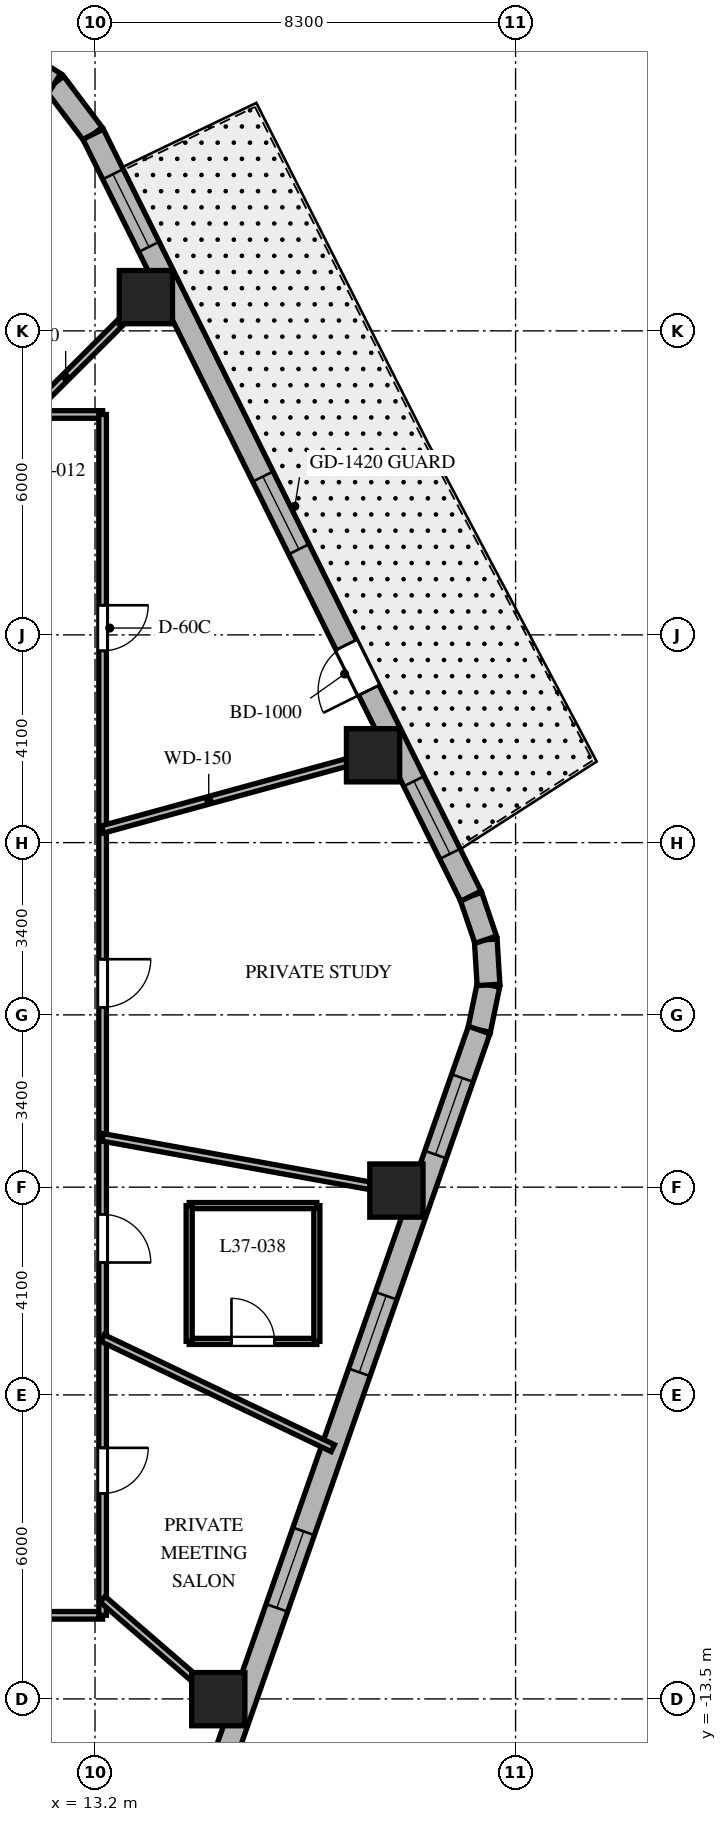
"""IFC4 building model, lengths in metres.
Left out: names, types, materials, properties, quantities, classifications, styles, units other than length and angle.
Written with IfcOpenShell. Run it as: python <this file> out.ifc"""

import sys

from ifc_helpers import new_model, si_unit, direction, frame, frame_2d, origin, origin_2d, place, context, subcontext, project, spatial, rectangle, extrude, element, fill, save


model = new_model("IFC4")
c1 = context("Model", 3, precision=1e-05, world=origin(), true_north=direction((0.0, 1.0)))
c2 = subcontext(c1, "Body", "Model", "MODEL_VIEW")
j1 = project(units=[si_unit("LENGTHUNIT", "METRE"), si_unit("PLANEANGLEUNIT", "RADIAN")], contexts=[c1])
p1 = place(None, origin())
s1 = spatial("IfcSite", under=j1, at=p1, CompositionType="ELEMENT")
p2 = place(p1, origin())
s2 = spatial("IfcBuilding", under=s1, at=p2, CompositionType="ELEMENT")
p3 = place(p2, frame((0.0, 0.0, 151.7)))
s3 = spatial("IfcBuildingStorey", under=s2, at=p3, CompositionType="ELEMENT", Elevation=151.7)
for number, where, z_axis, x_axis in (
    (1, (15.633, -13.505, 0.0), (0.0, 0.0, 1.0), (1.0, 0.0, 0.0)),
    (2, (19.148, -3.467, 0.0), (0.0, 0.0, 1.0), (1.0, 0.0, 0.0)),
    (3, (18.687, 5.124, 0.0), (0.0, 0.0, 1.0), (1.0, 0.0, 0.0)),
    (4, (14.204, 14.166, 0.0), (0.0, 0.0, 1.0), (1.0, 0.0, 0.0)),
):
    element("IfcColumn", number, at=place(p3, frame(where, z_axis=z_axis, x_axis=x_axis)), inside=s3, PredefinedType="COLUMN", context=c2, shape_type="SweptSolid", body=[
        extrude(rectangle(XDim=1.05, YDim=1.05, at=origin_2d()), origin(), (0.0, 0.0, 1.0), 3.7),
    ])
p4 = place(p3, frame((20.782, -0.298, 0.0), z_axis=(0.0, 0.0, 1.0), x_axis=(0.202570068411, 0.979267771033, 0.0)))
e5 = element("IfcWall", 5, at=p4, inside=s3, PredefinedType="SOLIDWALL", context=c2, shape_type="SweptSolid", body=[
    extrude(rectangle(XDim=0.909, YDim=0.45, at=frame_2d((0.454, 0.0))), origin(), (0.0, 0.0, 1.0), 3.4),
])
p5 = place(p3, frame((20.966, 0.592, 0.0), z_axis=(0.0, 0.0, 1.0), x_axis=(-0.061748898935, 0.998091715966, 0.0)))
e6 = element("IfcWall", 6, at=p5, inside=s3, PredefinedType="SOLIDWALL", context=c2, shape_type="SweptSolid", body=[
    extrude(rectangle(XDim=0.894, YDim=0.45, at=frame_2d((0.447, 0.0))), origin(), (0.0, 0.0, 1.0), 3.4),
])
p6 = place(p3, frame((20.911, 1.484, 0.0), z_axis=(0.0, 0.0, 1.0), x_axis=(-0.321623334353, 0.946867694453, 0.0)))
e7 = element("IfcWall", 7, at=p6, inside=s3, PredefinedType="SOLIDWALL", context=c2, shape_type="SweptSolid", body=[
    extrude(rectangle(XDim=0.909, YDim=0.45, at=frame_2d((0.454, 0.0))), origin(), (0.0, 0.0, 1.0), 3.4),
])
p7 = place(p3, frame((13.162, 17.381, 0.0), z_axis=(0.0, 0.0, 1.0), x_axis=(-0.601515770517, 0.798860925205, 0.0)))
e8 = element("IfcWall", 8, at=p7, inside=s3, PredefinedType="SOLIDWALL", context=c2, shape_type="SweptSolid", body=[
    extrude(rectangle(XDim=1.262, YDim=0.45, at=frame_2d((0.631, 0.0))), origin(), (0.0, 0.0, 1.0), 3.4),
])
p8 = place(p3, frame((12.403, 18.389, 0.0), z_axis=(0.0, 0.0, 1.0), x_axis=(-0.849795170926, 0.527113049991, 0.0)))
e9 = element("IfcWall", 9, at=p8, inside=s3, PredefinedType="SOLIDWALL", context=c2, shape_type="SweptSolid", body=[
    extrude(rectangle(XDim=1.241, YDim=0.45, at=frame_2d((0.62, 0.0))), origin(), (0.0, 0.0, 1.0), 3.4),
])
p9 = place(p3, frame((14.937, -16.993, 0.0), z_axis=(0.0, 0.0, 1.0), x_axis=(0.330431575061, 0.943829949834, 0.0)))
e10 = element("IfcWall", 10, at=p9, inside=s3, PredefinedType="SOLIDWALL", context=c2, shape_type="SweptSolid", body=[
    extrude(rectangle(XDim=17.689, YDim=0.45, at=frame_2d((8.844, 0.0))), origin(), (0.0, 0.0, 1.0), 3.4),
])
p10 = place(p9, frame((0.95, 0.0, 0.8)))
e11 = element("IfcOpeningElement", 11, at=p10, cuts=e10, PredefinedType="OPENING", context=c2, shape_type="SweptSolid", body=[
    extrude(rectangle(XDim=1.6, YDim=1.75, at=frame_2d((0.8, 0.875))), frame((0.0, 0.235, 0.0), z_axis=(0.0, -1.0, 0.0), x_axis=(1.0, 0.0, 0.0)), (0.0, 0.0, 1.0), 0.47),
])
p11 = place(p9, frame((5.605, 0.0, 0.8)))
e12 = element("IfcOpeningElement", 12, at=p11, cuts=e10, PredefinedType="OPENING", context=c2, shape_type="SweptSolid", body=[
    extrude(rectangle(XDim=1.6, YDim=1.75, at=frame_2d((0.8, 0.875))), frame((0.0, 0.235, 0.0), z_axis=(0.0, -1.0, 0.0), x_axis=(1.0, 0.0, 0.0)), (0.0, 0.0, 1.0), 0.47),
])
p12 = place(p9, frame((10.531, 0.0, 0.8)))
e13 = element("IfcOpeningElement", 13, at=p12, cuts=e10, PredefinedType="OPENING", context=c2, shape_type="SweptSolid", body=[
    extrude(rectangle(XDim=1.6, YDim=1.75, at=frame_2d((0.8, 0.875))), frame((0.0, 0.235, 0.0), z_axis=(0.0, -1.0, 0.0), x_axis=(1.0, 0.0, 0.0)), (0.0, 0.0, 1.0), 0.47),
])
p13 = place(p9, frame((15.084, 0.0, 0.8)))
e14 = element("IfcOpeningElement", 14, at=p13, cuts=e10, PredefinedType="OPENING", context=c2, shape_type="SweptSolid", body=[
    extrude(rectangle(XDim=1.6, YDim=1.75, at=frame_2d((0.8, 0.875))), frame((0.0, 0.235, 0.0), z_axis=(0.0, -1.0, 0.0), x_axis=(1.0, 0.0, 0.0)), (0.0, 0.0, 1.0), 0.47),
])
p14 = place(p3, frame((20.618, 2.344, 0.0), z_axis=(0.0, 0.0, 1.0), x_axis=(-0.444243691097, 0.895905990002, 0.0)))
e15 = element("IfcWall", 15, at=p14, inside=s3, PredefinedType="SOLIDWALL", context=c2, shape_type="SweptSolid", body=[
    extrude(rectangle(XDim=16.784, YDim=0.45, at=frame_2d((8.392, 0.0))), origin(), (0.0, 0.0, 1.0), 3.4),
])
p15 = place(p14, frame((4.535, 0.0, 0.0)))
e16 = element("IfcOpeningElement", 16, at=p15, cuts=e15, PredefinedType="OPENING", context=c2, shape_type="SweptSolid", body=[
    extrude(rectangle(XDim=1.0, YDim=2.15, at=frame_2d((0.5, 1.075))), frame((0.0, 0.235, 0.0), z_axis=(0.0, -1.0, 0.0), x_axis=(1.0, 0.0, 0.0)), (0.0, 0.0, 1.0), 0.47),
])
p16 = place(p14, frame((7.642, 0.0, 0.8)))
e17 = element("IfcOpeningElement", 17, at=p16, cuts=e15, PredefinedType="OPENING", context=c2, shape_type="SweptSolid", body=[
    extrude(rectangle(XDim=1.6, YDim=1.75, at=frame_2d((0.8, 0.875))), frame((0.0, 0.235, 0.0), z_axis=(0.0, -1.0, 0.0), x_axis=(1.0, 0.0, 0.0)), (0.0, 0.0, 1.0), 0.47),
])
p17 = place(p14, frame((14.303, 0.0, 0.8)))
e18 = element("IfcOpeningElement", 18, at=p17, cuts=e15, PredefinedType="OPENING", context=c2, shape_type="SweptSolid", body=[
    extrude(rectangle(XDim=1.6, YDim=1.75, at=frame_2d((0.8, 0.875))), frame((0.0, 0.235, 0.0), z_axis=(0.0, -1.0, 0.0), x_axis=(1.0, 0.0, 0.0)), (0.0, 0.0, 1.0), 0.47),
])
p18 = place(p14, frame((0.931, 0.0, 0.8)))
e19 = element("IfcOpeningElement", 19, at=p18, cuts=e15, PredefinedType="OPENING", context=c2, shape_type="SweptSolid", body=[
    extrude(rectangle(XDim=1.6, YDim=1.75, at=frame_2d((0.8, 0.875))), frame((0.0, 0.235, 0.0), z_axis=(0.0, -1.0, 0.0), x_axis=(1.0, 0.0, 0.0)), (0.0, 0.0, 1.0), 0.47),
])
p19 = place(p3, frame((13.35, -11.85, 0.0), z_axis=(0.0, 0.0, 1.0), x_axis=(-1.0, 0.0, 0.0)))
e20 = element("IfcWall", 20, at=p19, inside=s3, PredefinedType="PARTITIONING", context=c2, shape_type="SweptSolid", body=[
    extrude(rectangle(XDim=26.7, YDim=0.15, at=frame_2d((13.35, 0.0))), origin(), (0.0, 0.0, 1.0), 2.84),
])
p20 = place(p19, frame((20.682, 0.0, 0.0)))
e21 = element("IfcOpeningElement", 21, at=p20, cuts=e20, PredefinedType="OPENING", context=c2, shape_type="SweptSolid", body=[
    extrude(rectangle(XDim=0.95, YDim=2.03, at=frame_2d((0.475, 1.015))), frame((0.0, 0.085, 0.0), z_axis=(0.0, -1.0, 0.0), x_axis=(1.0, 0.0, 0.0)), (0.0, 0.0, 1.0), 0.17),
])
p21 = place(p19, frame((12.362, 0.0, 0.0)))
e22 = element("IfcOpeningElement", 22, at=p21, cuts=e20, PredefinedType="OPENING", context=c2, shape_type="SweptSolid", body=[
    extrude(rectangle(XDim=0.95, YDim=2.03, at=frame_2d((0.475, 1.015))), frame((0.0, 0.085, 0.0), z_axis=(0.0, -1.0, 0.0), x_axis=(1.0, 0.0, 0.0)), (0.0, 0.0, 1.0), 0.17),
])
p22 = place(p19, frame((3.995, 0.0, 0.0)))
e23 = element("IfcOpeningElement", 23, at=p22, cuts=e20, PredefinedType="OPENING", context=c2, shape_type="SweptSolid", body=[
    extrude(rectangle(XDim=0.95, YDim=2.03, at=frame_2d((0.475, 1.015))), frame((0.0, 0.085, 0.0), z_axis=(0.0, -1.0, 0.0), x_axis=(1.0, 0.0, 0.0)), (0.0, 0.0, 1.0), 0.17),
])
p23 = place(p3, frame((-13.35, 11.85, 0.0), z_axis=(0.0, 0.0, 1.0), x_axis=(1.0, 0.0, 0.0)))
e24 = element("IfcWall", 24, at=p23, inside=s3, PredefinedType="PARTITIONING", context=c2, shape_type="SweptSolid", body=[
    extrude(rectangle(XDim=26.7, YDim=0.15, at=frame_2d((13.35, 0.0))), origin(), (0.0, 0.0, 1.0), 2.84),
])
p24 = place(p23, frame((20.682, 0.0, 0.0)))
e25 = element("IfcOpeningElement", 25, at=p24, cuts=e24, PredefinedType="OPENING", context=c2, shape_type="SweptSolid", body=[
    extrude(rectangle(XDim=0.95, YDim=2.03, at=frame_2d((0.475, 1.015))), frame((0.0, 0.085, 0.0), z_axis=(0.0, -1.0, 0.0), x_axis=(1.0, 0.0, 0.0)), (0.0, 0.0, 1.0), 0.17),
])
p25 = place(p23, frame((14.229, 0.0, 0.0)))
e26 = element("IfcOpeningElement", 26, at=p25, cuts=e24, PredefinedType="OPENING", context=c2, shape_type="SweptSolid", body=[
    extrude(rectangle(XDim=0.95, YDim=2.03, at=frame_2d((0.475, 1.015))), frame((0.0, 0.085, 0.0), z_axis=(0.0, -1.0, 0.0), x_axis=(1.0, 0.0, 0.0)), (0.0, 0.0, 1.0), 0.17),
])
p26 = place(p23, frame((10.075, 0.0, 0.0)))
e27 = element("IfcOpeningElement", 27, at=p26, cuts=e24, PredefinedType="OPENING", context=c2, shape_type="SweptSolid", body=[
    extrude(rectangle(XDim=0.95, YDim=2.03, at=frame_2d((0.475, 1.015))), frame((0.0, 0.085, 0.0), z_axis=(0.0, -1.0, 0.0), x_axis=(1.0, 0.0, 0.0)), (0.0, 0.0, 1.0), 0.17),
])
p27 = place(p23, frame((3.995, 0.0, 0.0)))
e28 = element("IfcOpeningElement", 28, at=p27, cuts=e24, PredefinedType="OPENING", context=c2, shape_type="SweptSolid", body=[
    extrude(rectangle(XDim=0.95, YDim=2.03, at=frame_2d((0.475, 1.015))), frame((0.0, 0.085, 0.0), z_axis=(0.0, -1.0, 0.0), x_axis=(1.0, 0.0, 0.0)), (0.0, 0.0, 1.0), 0.17),
])
p28 = place(p3, frame((13.35, 11.85, 0.0), z_axis=(0.0, 0.0, 1.0), x_axis=(0.0, -1.0, 0.0)))
e29 = element("IfcWall", 29, at=p28, inside=s3, PredefinedType="PARTITIONING", context=c2, shape_type="SweptSolid", body=[
    extrude(rectangle(XDim=23.7, YDim=0.15, at=frame_2d((11.85, 0.0))), origin(), (0.0, 0.0, 1.0), 2.84),
])
p29 = place(p28, frame((3.765, 0.0, 0.0)))
e30 = element("IfcOpeningElement", 30, at=p29, cuts=e29, PredefinedType="OPENING", context=c2, shape_type="SweptSolid", body=[
    extrude(rectangle(XDim=0.9, YDim=2.03, at=frame_2d((0.45, 1.015))), frame((0.0, 0.085, 0.0), z_axis=(0.0, -1.0, 0.0), x_axis=(1.0, 0.0, 0.0)), (0.0, 0.0, 1.0), 0.17),
])
p30 = place(p28, frame((20.395, 0.0, 0.0)))
e31 = element("IfcOpeningElement", 31, at=p30, cuts=e29, PredefinedType="OPENING", context=c2, shape_type="SweptSolid", body=[
    extrude(rectangle(XDim=0.9, YDim=2.03, at=frame_2d((0.45, 1.015))), frame((0.0, 0.085, 0.0), z_axis=(0.0, -1.0, 0.0), x_axis=(1.0, 0.0, 0.0)), (0.0, 0.0, 1.0), 0.17),
])
p31 = place(p28, frame((15.787, 0.0, 0.0)))
e32 = element("IfcOpeningElement", 32, at=p31, cuts=e29, PredefinedType="OPENING", context=c2, shape_type="SweptSolid", body=[
    extrude(rectangle(XDim=0.95, YDim=2.03, at=frame_2d((0.475, 1.015))), frame((0.0, 0.085, 0.0), z_axis=(0.0, -1.0, 0.0), x_axis=(1.0, 0.0, 0.0)), (0.0, 0.0, 1.0), 0.17),
])
p32 = place(p28, frame((10.751, 0.0, 0.0)))
e33 = element("IfcOpeningElement", 33, at=p32, cuts=e29, PredefinedType="OPENING", context=c2, shape_type="SweptSolid", body=[
    extrude(rectangle(XDim=0.95, YDim=2.03, at=frame_2d((0.475, 1.015))), frame((0.0, 0.085, 0.0), z_axis=(0.0, -1.0, 0.0), x_axis=(1.0, 0.0, 0.0)), (0.0, 0.0, 1.0), 0.17),
])
p33 = place(p3, frame((13.35, 3.661, 0.0), z_axis=(0.0, 0.0, 1.0), x_axis=(0.964397145454, 0.264458211898, 0.0)))
e34 = element("IfcWall", 34, at=p33, inside=s3, PredefinedType="PARTITIONING", context=c2, shape_type="SweptSolid", body=[
    extrude(rectangle(XDim=6.039, YDim=0.15, at=frame_2d((3.019, 0.0))), origin(), (0.0, 0.0, 1.0), 2.64),
])
p34 = place(p3, frame((11.882, 11.85, 0.0), z_axis=(0.0, 0.0, 1.0), x_axis=(0.708037373639, 0.706174962407, 0.0)))
e35 = element("IfcWall", 35, at=p34, inside=s3, PredefinedType="PARTITIONING", context=c2, shape_type="SweptSolid", body=[
    extrude(rectangle(XDim=3.802, YDim=0.15, at=frame_2d((1.901, 0.0))), origin(), (0.0, 0.0, 1.0), 2.64),
])
p35 = place(p3, frame((13.35, -11.533, 0.0), z_axis=(0.0, 0.0, 1.0), x_axis=(0.756711647314, -0.65374879183, 0.0)))
e36 = element("IfcWall", 36, at=p35, inside=s3, PredefinedType="PARTITIONING", context=c2, shape_type="SweptSolid", body=[
    extrude(rectangle(XDim=3.55, YDim=0.15, at=frame_2d((1.775, 0.0))), origin(), (0.0, 0.0, 1.0), 2.64),
])
p36 = place(p3, frame((13.35, -6.38, 0.0), z_axis=(0.0, 0.0, 1.0), x_axis=(0.90225728206, -0.431198094812, 0.0)))
e37 = element("IfcWall", 37, at=p36, inside=s3, PredefinedType="PARTITIONING", context=c2, shape_type="SweptSolid", body=[
    extrude(rectangle(XDim=5.035, YDim=0.15, at=frame_2d((2.517, 0.0))), origin(), (0.0, 0.0, 1.0), 2.64),
])
p37 = place(p3, frame((13.35, -2.417, 0.0), z_axis=(0.0, 0.0, 1.0), x_axis=(0.98399796473, -0.178179699761, 0.0)))
e38 = element("IfcWall", 38, at=p37, inside=s3, PredefinedType="PARTITIONING", context=c2, shape_type="SweptSolid", body=[
    extrude(rectangle(XDim=6.393, YDim=0.15, at=frame_2d((3.197, 0.0))), origin(), (0.0, 0.0, 1.0), 2.64),
])
p38 = place(p3, frame((15.058, -6.444, 0.0), z_axis=(0.0, 0.0, 1.0), x_axis=(1.0, 0.0, 0.0)))
e39 = element("IfcWall", 39, at=p38, inside=s3, PredefinedType="PARTITIONING", context=c2, shape_type="SweptSolid", body=[
    extrude(rectangle(XDim=2.52, YDim=0.12, at=frame_2d((1.26, 0.0))), origin(), (0.0, 0.0, 1.0), 2.972),
])
p39 = place(p38, frame((0.835, 0.0, 0.0)))
e40 = element("IfcOpeningElement", 40, at=p39, cuts=e39, PredefinedType="OPENING", context=c2, shape_type="SweptSolid", body=[
    extrude(rectangle(XDim=0.85, YDim=2.03, at=frame_2d((0.425, 1.015))), frame((0.0, 0.07, 0.0), z_axis=(0.0, -1.0, 0.0), x_axis=(1.0, 0.0, 0.0)), (0.0, 0.0, 1.0), 0.14),
])
p40 = place(p3, frame((17.578, -6.444, 0.0), z_axis=(0.0, 0.0, 1.0), x_axis=(0.0, 1.0, 0.0)))
e41 = element("IfcWall", 41, at=p40, inside=s3, PredefinedType="PARTITIONING", context=c2, shape_type="SweptSolid", body=[
    extrude(rectangle(XDim=2.68, YDim=0.12, at=frame_2d((1.34, 0.0))), origin(), (0.0, 0.0, 1.0), 2.84),
])
p41 = place(p3, frame((17.578, -3.764, 0.0), z_axis=(0.0, 0.0, 1.0), x_axis=(-1.0, 0.0, 0.0)))
e42 = element("IfcWall", 42, at=p41, inside=s3, PredefinedType="PARTITIONING", context=c2, shape_type="SweptSolid", body=[
    extrude(rectangle(XDim=2.52, YDim=0.12, at=frame_2d((1.26, 0.0))), origin(), (0.0, 0.0, 1.0), 2.84),
])
p42 = place(p3, frame((15.058, -3.764, 0.0), z_axis=(0.0, 0.0, 1.0), x_axis=(0.0, -1.0, 0.0)))
e43 = element("IfcWall", 43, at=p42, inside=s3, PredefinedType="PARTITIONING", context=c2, shape_type="SweptSolid", body=[
    extrude(rectangle(XDim=2.68, YDim=0.12, at=frame_2d((1.34, 0.0))), origin(), (0.0, 0.0, 1.0), 2.84),
])
p43 = place(p11, origin())
e44 = element("IfcWindow", 44, at=p43, inside=s3, PartitioningType="SINGLE_PANEL", PredefinedType="WINDOW", context=c2, shape_type="SweptSolid", body=[
    extrude(rectangle(XDim=1.6, YDim=1.75, at=frame_2d((0.8, 0.875))), frame((0.0, 0.03, 0.0), z_axis=(0.0, -1.0, 0.0), x_axis=(1.0, 0.0, 0.0)), (0.0, 0.0, 1.0), 0.06),
])
fill(e12, e44)
p44 = place(p12, origin())
e45 = element("IfcWindow", 45, at=p44, inside=s3, PartitioningType="SINGLE_PANEL", PredefinedType="WINDOW", context=c2, shape_type="SweptSolid", body=[
    extrude(rectangle(XDim=1.6, YDim=1.75, at=frame_2d((0.8, 0.875))), frame((0.0, 0.03, 0.0), z_axis=(0.0, -1.0, 0.0), x_axis=(1.0, 0.0, 0.0)), (0.0, 0.0, 1.0), 0.06),
])
fill(e13, e45)
p45 = place(p13, origin())
e46 = element("IfcWindow", 46, at=p45, inside=s3, PartitioningType="SINGLE_PANEL", PredefinedType="WINDOW", context=c2, shape_type="SweptSolid", body=[
    extrude(rectangle(XDim=1.6, YDim=1.75, at=frame_2d((0.8, 0.875))), frame((0.0, 0.03, 0.0), z_axis=(0.0, -1.0, 0.0), x_axis=(1.0, 0.0, 0.0)), (0.0, 0.0, 1.0), 0.06),
])
fill(e14, e46)
p46 = place(p15, origin())
e47 = element("IfcDoor", 47, at=p46, inside=s3, OperationType="SINGLE_SWING_LEFT", PredefinedType="DOOR", context=c2, shape_type="SweptSolid", body=[
    extrude(rectangle(XDim=1.0, YDim=2.15, at=frame_2d((0.5, 1.075))), frame((0.0, 0.025, 0.0), z_axis=(0.0, -1.0, 0.0), x_axis=(1.0, 0.0, 0.0)), (0.0, 0.0, 1.0), 0.05),
])
fill(e16, e47)
p47 = place(p16, origin())
e48 = element("IfcWindow", 48, at=p47, inside=s3, PartitioningType="SINGLE_PANEL", PredefinedType="WINDOW", context=c2, shape_type="SweptSolid", body=[
    extrude(rectangle(XDim=1.6, YDim=1.75, at=frame_2d((0.8, 0.875))), frame((0.0, 0.03, 0.0), z_axis=(0.0, -1.0, 0.0), x_axis=(1.0, 0.0, 0.0)), (0.0, 0.0, 1.0), 0.06),
])
fill(e17, e48)
p48 = place(p17, origin())
e49 = element("IfcWindow", 49, at=p48, inside=s3, PartitioningType="SINGLE_PANEL", PredefinedType="WINDOW", context=c2, shape_type="SweptSolid", body=[
    extrude(rectangle(XDim=1.6, YDim=1.75, at=frame_2d((0.8, 0.875))), frame((0.0, 0.03, 0.0), z_axis=(0.0, -1.0, 0.0), x_axis=(1.0, 0.0, 0.0)), (0.0, 0.0, 1.0), 0.06),
])
fill(e18, e49)
p49 = place(p18, origin())
e50 = element("IfcWindow", 50, at=p49, inside=s3, PartitioningType="SINGLE_PANEL", PredefinedType="WINDOW", context=c2, shape_type="SweptSolid", body=[
    extrude(rectangle(XDim=1.6, YDim=1.75, at=frame_2d((0.8, 0.875))), frame((0.0, 0.03, 0.0), z_axis=(0.0, -1.0, 0.0), x_axis=(1.0, 0.0, 0.0)), (0.0, 0.0, 1.0), 0.06),
])
fill(e19, e50)
p50 = place(p29, origin())
e51 = element("IfcDoor", 51, at=p50, inside=s3, OperationType="SINGLE_SWING_LEFT", PredefinedType="DOOR", context=c2, shape_type="SweptSolid", body=[
    extrude(rectangle(XDim=0.9, YDim=2.03, at=frame_2d((0.45, 1.015))), frame((0.0, 0.025, 0.0), z_axis=(0.0, -1.0, 0.0), x_axis=(1.0, 0.0, 0.0)), (0.0, 0.0, 1.0), 0.05),
])
fill(e30, e51)
p51 = place(p30, origin())
e52 = element("IfcDoor", 52, at=p51, inside=s3, OperationType="SINGLE_SWING_LEFT", PredefinedType="DOOR", context=c2, shape_type="SweptSolid", body=[
    extrude(rectangle(XDim=0.9, YDim=2.03, at=frame_2d((0.45, 1.015))), frame((0.0, 0.025, 0.0), z_axis=(0.0, -1.0, 0.0), x_axis=(1.0, 0.0, 0.0)), (0.0, 0.0, 1.0), 0.05),
])
fill(e31, e52)
p52 = place(p31, origin())
e53 = element("IfcDoor", 53, at=p52, inside=s3, OperationType="SINGLE_SWING_RIGHT", PredefinedType="DOOR", context=c2, shape_type="SweptSolid", body=[
    extrude(rectangle(XDim=0.95, YDim=2.03, at=frame_2d((0.475, 1.015))), frame((0.0, 0.025, 0.0), z_axis=(0.0, -1.0, 0.0), x_axis=(1.0, 0.0, 0.0)), (0.0, 0.0, 1.0), 0.05),
])
fill(e32, e53)
p53 = place(p39, origin())
e54 = element("IfcDoor", 54, at=p53, inside=s3, OperationType="SINGLE_SWING_LEFT", PredefinedType="DOOR", context=c2, shape_type="SweptSolid", body=[
    extrude(rectangle(XDim=0.85, YDim=2.03, at=frame_2d((0.425, 1.015))), frame((0.0, 0.025, 0.0), z_axis=(0.0, -1.0, 0.0), x_axis=(1.0, 0.0, 0.0)), (0.0, 0.0, 1.0), 0.05),
])
fill(e40, e54)
p54 = place(p32, origin())
e55 = element("IfcDoor", 55, at=p54, inside=s3, OperationType="SINGLE_SWING_LEFT", PredefinedType="DOOR", context=c2, shape_type="SweptSolid", body=[
    extrude(rectangle(XDim=0.95, YDim=2.03, at=frame_2d((0.475, 1.015))), frame((0.0, 0.025, 0.0), z_axis=(0.0, -1.0, 0.0), x_axis=(1.0, 0.0, 0.0)), (0.0, 0.0, 1.0), 0.05),
])
fill(e33, e55)
save(model, sys.argv[1])
